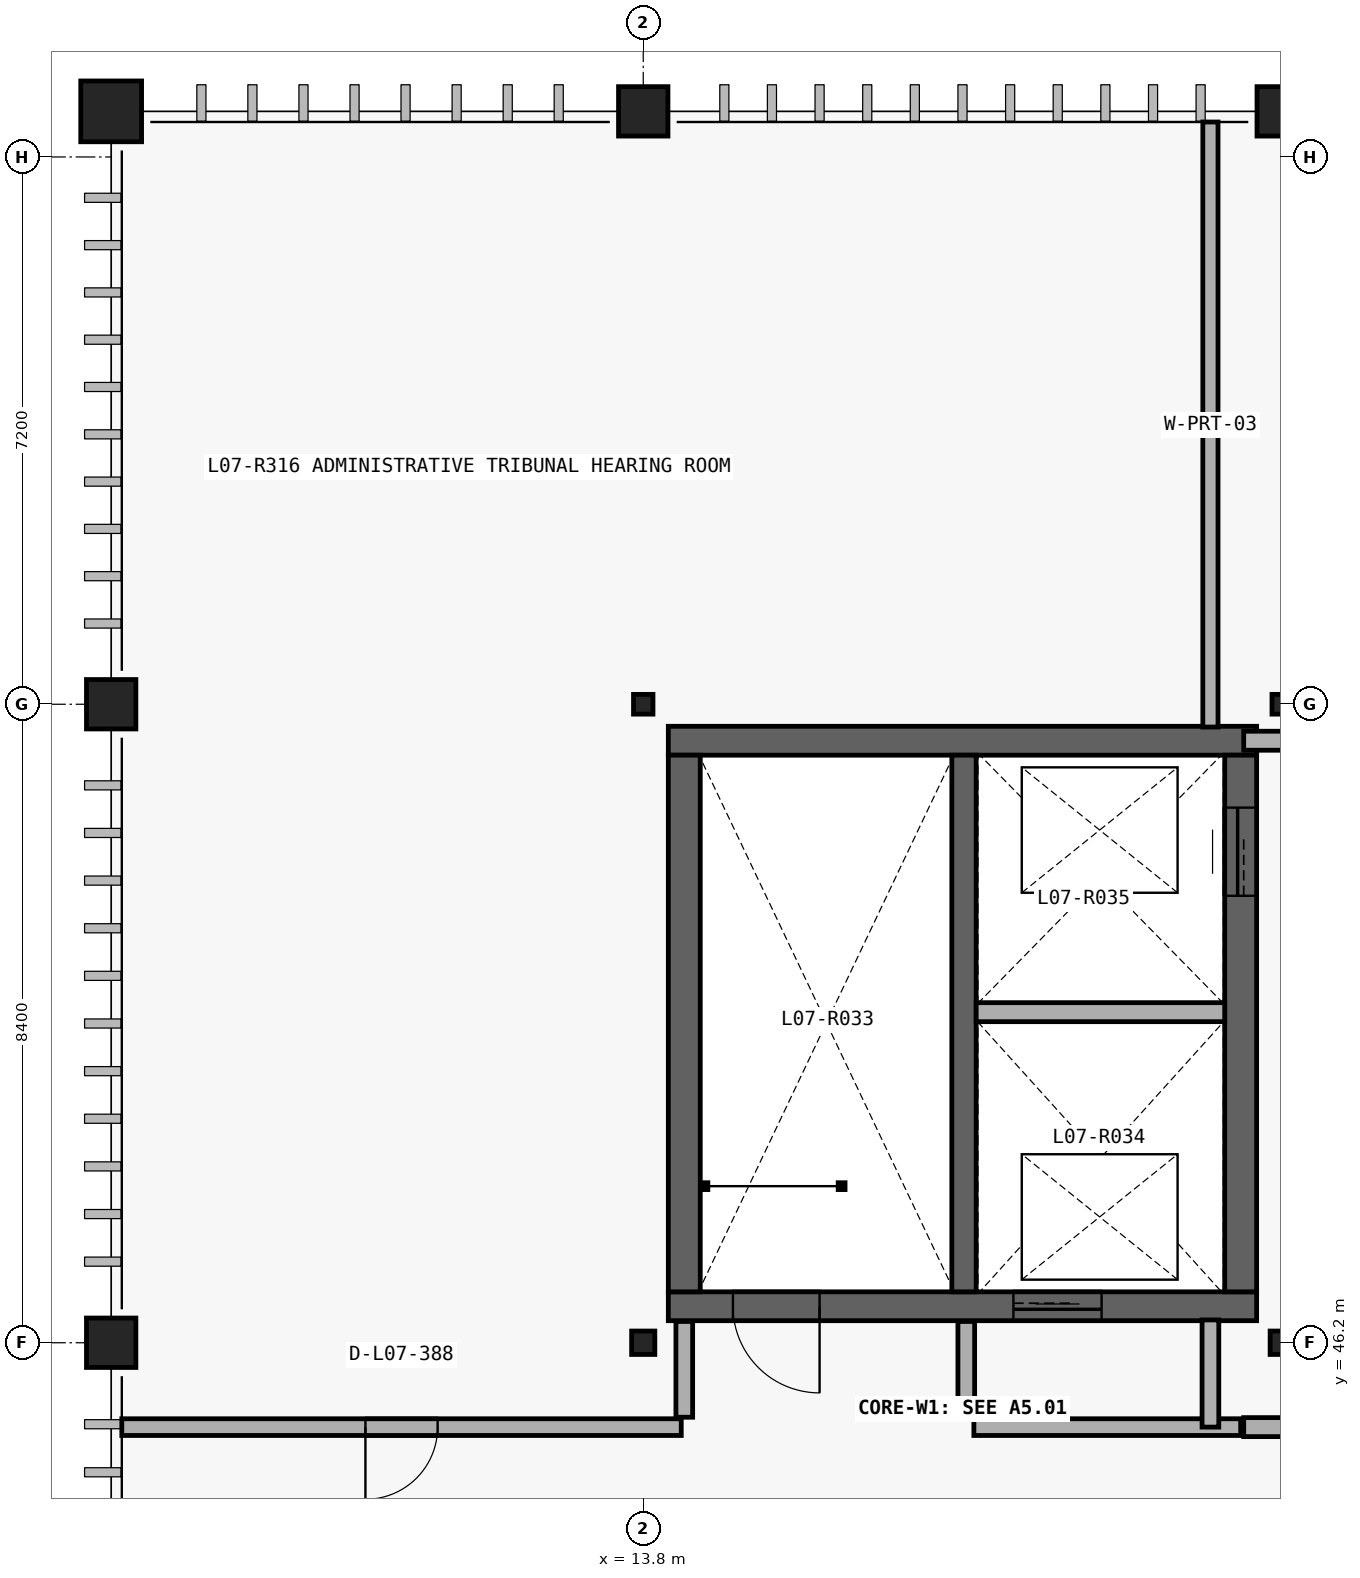
"""IFC4 building model, lengths in metres.
Left out: names, types, materials, properties, quantities, classifications, styles, units other than length and angle.
Written with IfcOpenShell. Run it as: python <this file> out.ifc"""

import sys

from ifc_helpers import new_model, si_unit, direction, frame, frame_2d, origin_with_axes, origin_2d_with_axis, place, context, subcontext, project, spatial, rectangle, circle, i_section, extrude, element, fill, save


model = new_model("IFC4")
c1 = context("Model", 3, precision=1e-05, world=origin_with_axes(), true_north=direction((0.0, 1.0)))
c2 = subcontext(c1, "Body", "Model", "MODEL_VIEW")
j1 = project(units=[si_unit("LENGTHUNIT", "METRE"), si_unit("PLANEANGLEUNIT", "RADIAN")], contexts=[c1])
p1 = place(None, origin_with_axes())
s1 = spatial("IfcSite", under=j1, at=p1, CompositionType="ELEMENT")
p2 = place(p1, origin_with_axes())
s2 = spatial("IfcBuilding", under=s1, at=p2, CompositionType="ELEMENT")
p3 = place(p2, frame((0.0, 0.0, 34.5), z_axis=(0.0, 0.0, 1.0), x_axis=(1.0, 0.0, 0.0)))
s3 = spatial("IfcBuildingStorey", under=s2, at=p3, CompositionType="ELEMENT", Elevation=34.5)
p4 = place(None, frame((14.13, 46.68, 34.5), z_axis=(0.0, 0.0, 1.0), x_axis=(1.0, 0.0, 0.0)))
e1 = element("IfcWall", 1, at=p4, inside=s3, PredefinedType="SHEAR", context=c2, shape_type="SweptSolid", body=[
    extrude(rectangle(XDim=7.74, YDim=0.38, at=frame_2d((3.87, 0.0), x_axis=(1.0, 0.0))), origin_with_axes(), (0.0, 0.0, 1.0), 4.5),
])
p5 = place(None, frame((15.55, 46.68, 34.5), z_axis=(0.0, 0.0, 1.0), x_axis=(1.0, 0.0, 0.0)))
e2 = element("IfcOpeningElement", 2, at=p5, cuts=e1, PredefinedType="OPENING", context=c2, shape_type="SweptSolid", body=[
    extrude(rectangle(XDim=1.14, YDim=2.18, at=frame_2d((0.0, 1.09), x_axis=(1.0, 0.0))), frame((0.0, 0.2, 0.0), z_axis=(0.0, -1.0, 0.0), x_axis=(1.0, 0.0, 0.0)), (0.0, 0.0, 1.0), 0.4),
])
p6 = place(None, frame((19.25, 46.68, 34.5), z_axis=(0.0, 0.0, 1.0), x_axis=(1.0, 0.0, 0.0)))
e3 = element("IfcOpeningElement", 3, at=p6, cuts=e1, PredefinedType="OPENING", context=c2, shape_type="SweptSolid", body=[
    extrude(rectangle(XDim=1.16, YDim=2.2, at=frame_2d((0.0, 1.1), x_axis=(1.0, 0.0))), frame((0.0, 0.2, 0.0), z_axis=(0.0, -1.0, 0.0), x_axis=(1.0, 0.0, 0.0)), (0.0, 0.0, 1.0), 0.4),
])
p7 = place(None, frame((21.87, 54.12, 34.5), z_axis=(0.0, 0.0, 1.0), x_axis=(-1.0, 0.0, 0.0)))
e4 = element("IfcWall", 4, at=p7, inside=s3, PredefinedType="SHEAR", context=c2, shape_type="SweptSolid", body=[
    extrude(rectangle(XDim=7.74, YDim=0.38, at=frame_2d((3.87, 0.0), x_axis=(1.0, 0.0))), origin_with_axes(), (0.0, 0.0, 1.0), 4.5),
])
p8 = place(None, frame((21.66, 46.87, 34.5), z_axis=(0.0, 0.0, 1.0), x_axis=(0.0, 1.0, 0.0)))
e5 = element("IfcWall", 5, at=p8, inside=s3, PredefinedType="SHEAR", context=c2, shape_type="SweptSolid", body=[
    extrude(rectangle(XDim=7.06, YDim=0.42, at=frame_2d((3.53, 0.0), x_axis=(1.0, 0.0))), origin_with_axes(), (0.0, 0.0, 1.0), 4.5),
])
p9 = place(None, frame((21.66, 52.66, 34.5), z_axis=(0.0, 0.0, 1.0), x_axis=(0.0, 1.0, 0.0)))
e6 = element("IfcOpeningElement", 6, at=p9, cuts=e5, PredefinedType="OPENING", context=c2, shape_type="SweptSolid", body=[
    extrude(rectangle(XDim=1.16, YDim=2.2, at=frame_2d((0.0, 1.1), x_axis=(1.0, 0.0))), frame((0.0, 0.22, 0.0), z_axis=(0.0, -1.0, 0.0), x_axis=(1.0, 0.0, 0.0)), (0.0, 0.0, 1.0), 0.44),
])
p10 = place(None, frame((14.34, 53.93, 34.5), z_axis=(0.0, 0.0, 1.0), x_axis=(0.0, -1.0, 0.0)))
e7 = element("IfcWall", 7, at=p10, inside=s3, PredefinedType="SHEAR", context=c2, shape_type="SweptSolid", body=[
    extrude(rectangle(XDim=7.06, YDim=0.42, at=frame_2d((3.53, 0.0), x_axis=(1.0, 0.0))), origin_with_axes(), (0.0, 0.0, 1.0), 4.5),
])
p11 = place(None, frame((18.02, 46.87, 34.5), z_axis=(0.0, 0.0, 1.0), x_axis=(0.0, 1.0, 0.0)))
e8 = element("IfcWall", 8, at=p11, inside=s3, PredefinedType="SHEAR", context=c2, shape_type="SweptSolid", body=[
    extrude(rectangle(XDim=7.06, YDim=0.32, at=frame_2d((3.53, 0.0), x_axis=(1.0, 0.0))), origin_with_axes(), (0.0, 0.0, 1.0), 4.5),
])
p12 = place(None, frame((18.18, 50.549, 34.5), z_axis=(0.0, 0.0, 1.0), x_axis=(1.0, 0.0, 0.0)))
e9 = element("IfcWall", 9, at=p12, inside=s3, PredefinedType="PARTITIONING", context=c2, shape_type="SweptSolid", body=[
    extrude(rectangle(XDim=3.27, YDim=0.25, at=frame_2d((1.635, 0.0), x_axis=(1.0, 0.0))), origin_with_axes(), (0.0, 0.0, 1.0), 4.14),
])
p13 = place(None, frame((21.7, 54.12, 34.5), z_axis=(0.0, 0.0, 1.0), x_axis=(1.0, 0.0, 0.0)))
e10 = element("IfcWall", 10, at=p13, inside=s3, PredefinedType="PARTITIONING", context=c2, shape_type="SweptSolid", body=[
    extrude(rectangle(XDim=3.36, YDim=0.25, at=frame_2d((1.68, 0.0), x_axis=(1.0, 0.0))), origin_with_axes(), (0.0, 0.0, 1.0), 4.14),
])
p14 = place(None, frame((21.7, 45.09, 34.5), z_axis=(0.0, 0.0, 1.0), x_axis=(1.0, 0.0, 0.0)))
e11 = element("IfcWall", 11, at=p14, inside=s3, PredefinedType="PARTITIONING", context=c2, shape_type="SweptSolid", body=[
    extrude(rectangle(XDim=3.36, YDim=0.25, at=frame_2d((1.68, 0.0), x_axis=(1.0, 0.0))), origin_with_axes(), (0.0, 0.0, 1.0), 4.14),
])
p15 = place(None, frame((24.005, 45.09, 34.5), z_axis=(0.0, 0.0, 1.0), x_axis=(1.0, 0.0, 0.0)))
e12 = element("IfcOpeningElement", 12, at=p15, cuts=e11, PredefinedType="OPENING", context=c2, shape_type="SweptSolid", body=[
    extrude(rectangle(XDim=0.91, YDim=2.12, at=frame_2d((0.0, 1.06), x_axis=(1.0, 0.0))), frame((0.0, 0.135, 0.0), z_axis=(0.0, -1.0, 0.0), x_axis=(1.0, 0.0, 0.0)), (0.0, 0.0, 1.0), 0.27),
])
for number, where, z_axis, x_axis in (
    (13, (14.34, 45.22, 34.5), (0.0, 0.0, 1.0), (0.0, 1.0, 0.0)),
    (14, (18.05, 45.22, 34.5), (0.0, 0.0, 1.0), (0.0, 1.0, 0.0)),
):
    element("IfcWall", number, at=place(None, frame(where, z_axis=z_axis, x_axis=x_axis)), inside=s3, PredefinedType="PARTITIONING", context=c2, shape_type="SweptSolid", body=[
        extrude(rectangle(XDim=1.26, YDim=0.22, at=frame_2d((0.63, 0.0), x_axis=(1.0, 0.0))), origin_with_axes(), (0.0, 0.0, 1.0), 4.14),
    ])
p16 = place(None, frame((6.94, 45.09, 34.5), z_axis=(0.0, 0.0, 1.0), x_axis=(1.0, 0.0, 0.0)))
e15 = element("IfcWall", 15, at=p16, inside=s3, PredefinedType="PARTITIONING", context=c2, shape_type="SweptSolid", body=[
    extrude(rectangle(XDim=7.36, YDim=0.22, at=frame_2d((3.68, 0.0), x_axis=(1.0, 0.0))), origin_with_axes(), (0.0, 0.0, 1.0), 4.14),
])
p17 = place(None, frame((10.62, 45.09, 34.5), z_axis=(0.0, 0.0, 1.0), x_axis=(1.0, 0.0, 0.0)))
e16 = element("IfcOpeningElement", 16, at=p17, cuts=e15, PredefinedType="OPENING", context=c2, shape_type="SweptSolid", body=[
    extrude(rectangle(XDim=0.95, YDim=2.16, at=frame_2d((0.0, 1.08), x_axis=(1.0, 0.0))), frame((0.0, 0.12, 0.0), z_axis=(0.0, -1.0, 0.0), x_axis=(1.0, 0.0, 0.0)), (0.0, 0.0, 1.0), 0.24),
])
p18 = place(None, frame((18.15, 45.09, 34.5), z_axis=(0.0, 0.0, 1.0), x_axis=(1.0, 0.0, 0.0)))
e17 = element("IfcWall", 17, at=p18, inside=s3, PredefinedType="PARTITIONING", context=c2, shape_type="SweptSolid", body=[
    extrude(rectangle(XDim=3.51, YDim=0.22, at=frame_2d((1.755, 0.0), x_axis=(1.0, 0.0))), origin_with_axes(), (0.0, 0.0, 1.0), 4.14),
])
p19 = place(None, frame((21.262, 45.09, 34.5), z_axis=(0.0, 0.0, 1.0), x_axis=(0.0, 1.0, 0.0)))
e18 = element("IfcWall", 18, at=p19, inside=s3, PredefinedType="PARTITIONING", context=c2, shape_type="SweptSolid", body=[
    extrude(rectangle(XDim=1.41, YDim=0.22, at=frame_2d((0.705, 0.0), x_axis=(1.0, 0.0))), origin_with_axes(), (0.0, 0.0, 1.0), 4.14),
])
p20 = place(None, frame((21.262, 54.3, 34.5), z_axis=(0.0, 0.0, 1.0), x_axis=(0.0, 1.0, 0.0)))
e19 = element("IfcWall", 19, at=p20, inside=s3, PredefinedType="PARTITIONING", context=c2, shape_type="SweptSolid", body=[
    extrude(rectangle(XDim=7.96, YDim=0.2, at=frame_2d((3.98, 0.0), x_axis=(1.0, 0.0))), origin_with_axes(), (0.0, 0.0, 1.0), 4.14),
])
for number, where, z_axis, x_axis in (
    (20, (6.8, 46.2, 34.5), (0.0, 0.0, 1.0), (1.0, 0.0, 0.0)),
    (21, (6.8, 54.6, 34.5), (0.0, 0.0, 1.0), (1.0, 0.0, 0.0)),
):
    element("IfcColumn", number, at=place(None, frame(where, z_axis=z_axis, x_axis=x_axis)), inside=s3, PredefinedType="COLUMN", context=c2, shape_type="SweptSolid", body=[
        extrude(circle(Radius=0.325, at=origin_2d_with_axis()), origin_with_axes(), (0.0, 0.0, 1.0), 4.5),
    ])
p21 = place(None, frame((6.8, 62.4, 34.5), z_axis=(0.0, 0.0, 1.0), x_axis=(1.0, 0.0, 0.0)))
e22 = element("IfcColumn", 22, at=p21, inside=s3, PredefinedType="COLUMN", context=c2, shape_type="SweptSolid", body=[
    extrude(circle(Radius=0.4, at=origin_2d_with_axis()), origin_with_axes(), (0.0, 0.0, 1.0), 4.5),
])
p22 = place(None, frame((13.8, 46.2, 34.5), z_axis=(0.0, 0.0, 1.0), x_axis=(1.0, 0.0, 0.0)))
e23 = element("IfcColumn", 23, at=p22, inside=s3, PredefinedType="COLUMN", context=c2, shape_type="SweptSolid", body=[
    extrude(i_section(OverallWidth=0.305, OverallDepth=0.308, WebThickness=0.01, FlangeThickness=0.015, at=origin_2d_with_axis()), origin_with_axes(), (0.0, 0.0, 1.0), 4.5),
])
p23 = place(None, frame((13.8, 54.6, 34.5), z_axis=(0.0, 0.0, 1.0), x_axis=(1.0, 0.0, 0.0)))
e24 = element("IfcColumn", 24, at=p23, inside=s3, PredefinedType="COLUMN", context=c2, shape_type="SweptSolid", body=[
    extrude(i_section(OverallWidth=0.256, OverallDepth=0.26, WebThickness=0.011, FlangeThickness=0.017, at=origin_2d_with_axis()), origin_with_axes(), (0.0, 0.0, 1.0), 4.5),
])
p24 = place(None, frame((13.8, 62.4, 34.5), z_axis=(0.0, 0.0, 1.0), x_axis=(1.0, 0.0, 0.0)))
e25 = element("IfcColumn", 25, at=p24, inside=s3, PredefinedType="COLUMN", context=c2, shape_type="SweptSolid", body=[
    extrude(circle(Radius=0.325, at=origin_2d_with_axis()), origin_with_axes(), (0.0, 0.0, 1.0), 4.5),
])
p25 = place(None, frame((22.2, 46.2, 34.5), z_axis=(0.0, 0.0, 1.0), x_axis=(1.0, 0.0, 0.0)))
e26 = element("IfcColumn", 26, at=p25, inside=s3, PredefinedType="COLUMN", context=c2, shape_type="SweptSolid", body=[
    extrude(i_section(OverallWidth=0.305, OverallDepth=0.308, WebThickness=0.01, FlangeThickness=0.015, at=origin_2d_with_axis()), origin_with_axes(), (0.0, 0.0, 1.0), 4.5),
])
p26 = place(None, frame((22.2, 54.6, 34.5), z_axis=(0.0, 0.0, 1.0), x_axis=(1.0, 0.0, 0.0)))
e27 = element("IfcColumn", 27, at=p26, inside=s3, PredefinedType="COLUMN", context=c2, shape_type="SweptSolid", body=[
    extrude(i_section(OverallWidth=0.256, OverallDepth=0.26, WebThickness=0.011, FlangeThickness=0.017, at=origin_2d_with_axis()), origin_with_axes(), (0.0, 0.0, 1.0), 4.5),
])
p27 = place(None, frame((22.2, 62.4, 34.5), z_axis=(0.0, 0.0, 1.0), x_axis=(1.0, 0.0, 0.0)))
e28 = element("IfcColumn", 28, at=p27, inside=s3, PredefinedType="COLUMN", context=c2, shape_type="SweptSolid", body=[
    extrude(circle(Radius=0.325, at=origin_2d_with_axis()), origin_with_axes(), (0.0, 0.0, 1.0), 4.5),
])
p28 = place(None, frame((15.55, 46.68, 34.5), z_axis=(0.0, 0.0, 1.0), x_axis=(-1.0, 0.0, 0.0)))
e29 = element("IfcDoor", 29, at=p28, inside=s3, OperationType="SINGLE_SWING_RIGHT", PredefinedType="DOOR", context=c2, shape_type="SweptSolid", body=[
    extrude(rectangle(XDim=1.14, YDim=2.18, at=frame_2d((0.0, 1.09), x_axis=(1.0, 0.0))), frame((0.0, 0.04, 0.0), z_axis=(0.0, -1.0, 0.0), x_axis=(1.0, 0.0, 0.0)), (0.0, 0.0, 1.0), 0.08),
])
fill(e2, e29)
p29 = place(None, frame((19.25, 46.68, 34.5), z_axis=(0.0, 0.0, 1.0), x_axis=(-1.0, 0.0, 0.0)))
e30 = element("IfcDoor", 30, at=p29, inside=s3, OperationType="SLIDING_TO_LEFT", PredefinedType="DOOR", context=c2, shape_type="SweptSolid", body=[
    extrude(rectangle(XDim=1.16, YDim=2.2, at=frame_2d((0.0, 1.1), x_axis=(1.0, 0.0))), frame((0.0, 0.04, 0.0), z_axis=(0.0, -1.0, 0.0), x_axis=(1.0, 0.0, 0.0)), (0.0, 0.0, 1.0), 0.08),
])
fill(e3, e30)
p30 = place(None, frame((21.66, 52.66, 34.5), z_axis=(0.0, 0.0, 1.0), x_axis=(0.0, 1.0, 0.0)))
e31 = element("IfcDoor", 31, at=p30, inside=s3, OperationType="SLIDING_TO_LEFT", PredefinedType="DOOR", context=c2, shape_type="SweptSolid", body=[
    extrude(rectangle(XDim=1.16, YDim=2.2, at=frame_2d((0.0, 1.1), x_axis=(1.0, 0.0))), frame((0.0, 0.04, 0.0), z_axis=(0.0, -1.0, 0.0), x_axis=(1.0, 0.0, 0.0)), (0.0, 0.0, 1.0), 0.08),
])
fill(e6, e31)
p31 = place(None, frame((10.62, 45.09, 34.5), z_axis=(0.0, 0.0, 1.0), x_axis=(-1.0, 0.0, 0.0)))
e32 = element("IfcDoor", 32, at=p31, inside=s3, OperationType="SINGLE_SWING_LEFT", PredefinedType="DOOR", context=c2, shape_type="SweptSolid", body=[
    extrude(rectangle(XDim=0.95, YDim=2.16, at=frame_2d((0.0, 1.08), x_axis=(1.0, 0.0))), frame((0.0, 0.04, 0.0), z_axis=(0.0, -1.0, 0.0), x_axis=(1.0, 0.0, 0.0)), (0.0, 0.0, 1.0), 0.08),
])
fill(e16, e32)
save(model, sys.argv[1])
